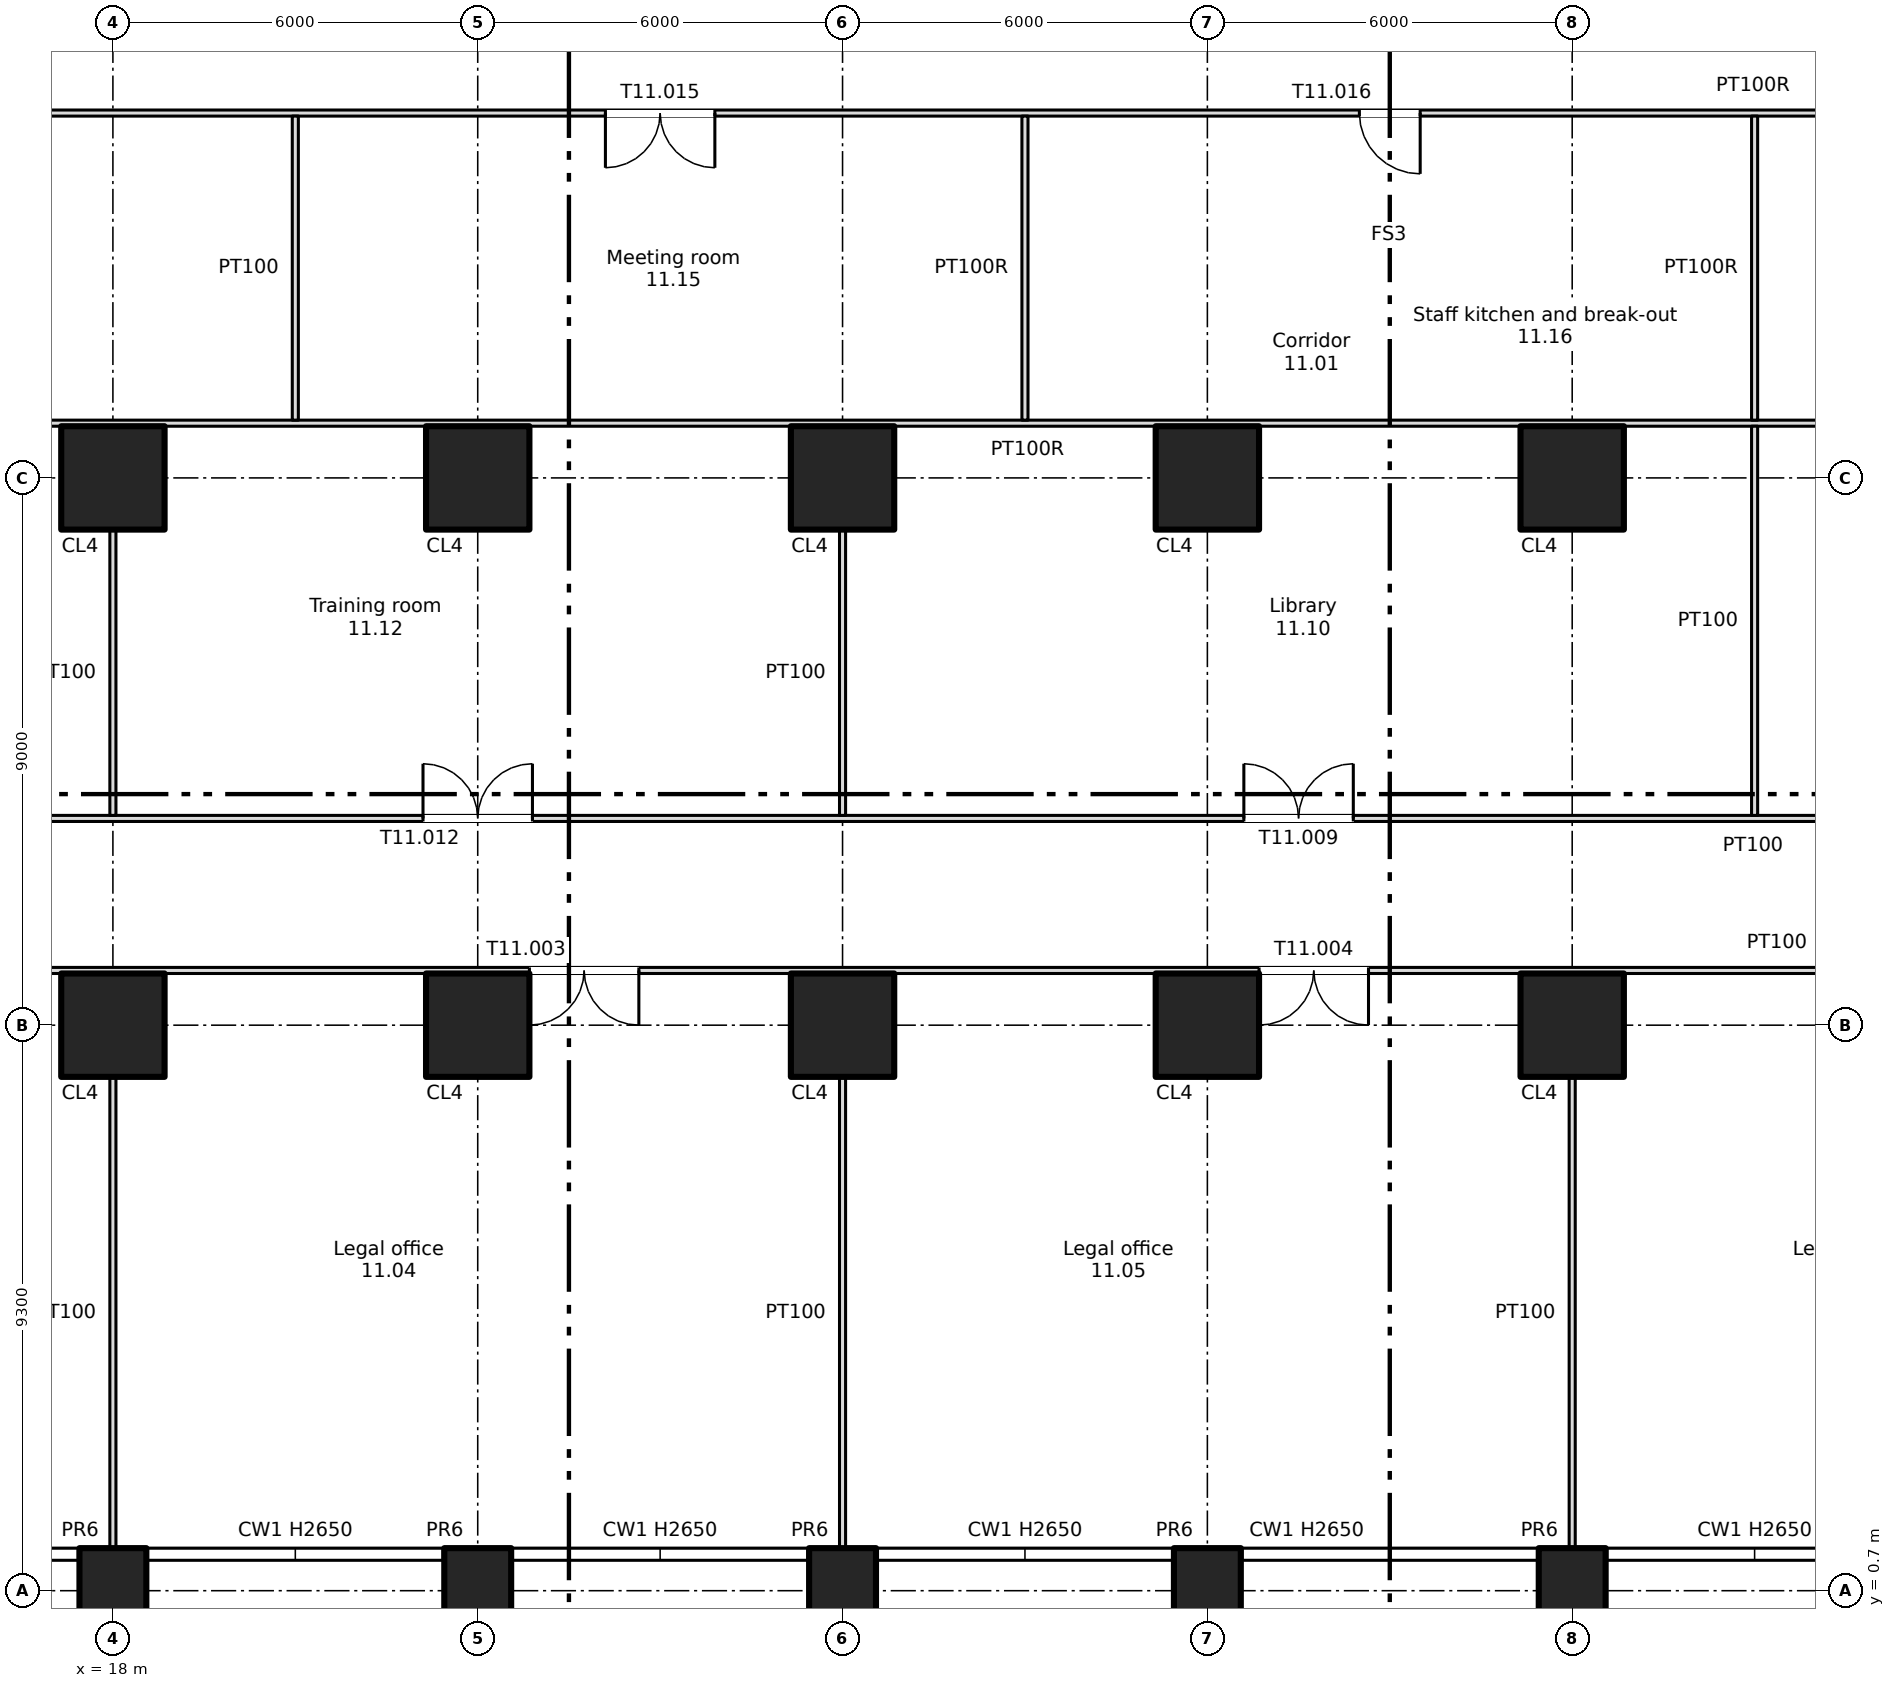
"""IFC4 building model, lengths in metres.
Left out: names, types, materials, properties, quantities, classifications, styles, units other than length and angle.
Written with IfcOpenShell. Run it as: python <this file> out.ifc"""

import sys

from ifc_helpers import new_model, si_unit, direction, frame, frame_2d, origin, origin_2d, place, context, subcontext, project, spatial, rectangle, extrude, element, fill, save


model = new_model("IFC4")
c1 = context("Model", 3, precision=1e-05, world=origin(), true_north=direction((0.0, 1.0)))
c2 = subcontext(c1, "Body", "Model", "MODEL_VIEW")
j1 = project(units=[si_unit("LENGTHUNIT", "METRE"), si_unit("PLANEANGLEUNIT", "RADIAN")], contexts=[c1])
p1 = place(None, origin())
s1 = spatial("IfcSite", under=j1, at=p1, CompositionType="ELEMENT")
p2 = place(p1, origin())
s2 = spatial("IfcBuilding", under=s1, at=p2, CompositionType="ELEMENT")
p3 = place(p2, frame((0.0, 0.0, 52.5)))
s3 = spatial("IfcBuildingStorey", under=s2, at=p3, CompositionType="ELEMENT", Elevation=52.5)
for number, where, z_axis, x_axis in (
    (1, (18.0, 0.7, -0.4), (0.0, 0.0, 1.0), (1.0, 0.0, 0.0)),
    (2, (24.0, 0.7, -0.4), (0.0, 0.0, 1.0), (1.0, 0.0, 0.0)),
    (3, (30.0, 0.7, -0.4), (0.0, 0.0, 1.0), (1.0, 0.0, 0.0)),
    (4, (36.0, 0.7, -0.4), (0.0, 0.0, 1.0), (1.0, 0.0, 0.0)),
    (5, (42.0, 0.7, -0.4), (0.0, 0.0, 1.0), (1.0, 0.0, 0.0)),
):
    element("IfcColumn", number, at=place(p3, frame(where, z_axis=z_axis, x_axis=x_axis)), inside=s3, PredefinedType="COLUMN", context=c2, shape_type="SweptSolid", body=[
        extrude(rectangle(XDim=1.1, YDim=1.4, at=origin_2d()), origin(), (0.0, 0.0, 1.0), 3.75),
    ])
for number, where, z_axis, x_axis in (
    (6, (18.0, 10.0, 0.0), (0.0, 0.0, 1.0), (1.0, 0.0, 0.0)),
    (7, (18.0, 19.0, 0.0), (0.0, 0.0, 1.0), (1.0, 0.0, 0.0)),
    (8, (24.0, 10.0, 0.0), (0.0, 0.0, 1.0), (1.0, 0.0, 0.0)),
    (9, (24.0, 19.0, 0.0), (0.0, 0.0, 1.0), (1.0, 0.0, 0.0)),
    (10, (30.0, 10.0, 0.0), (0.0, 0.0, 1.0), (1.0, 0.0, 0.0)),
    (11, (30.0, 19.0, 0.0), (0.0, 0.0, 1.0), (1.0, 0.0, 0.0)),
    (12, (36.0, 10.0, 0.0), (0.0, 0.0, 1.0), (1.0, 0.0, 0.0)),
    (13, (36.0, 19.0, 0.0), (0.0, 0.0, 1.0), (1.0, 0.0, 0.0)),
    (14, (42.0, 10.0, 0.0), (0.0, 0.0, 1.0), (1.0, 0.0, 0.0)),
    (15, (42.0, 19.0, 0.0), (0.0, 0.0, 1.0), (1.0, 0.0, 0.0)),
):
    element("IfcColumn", number, at=place(p3, frame(where, z_axis=z_axis, x_axis=x_axis)), inside=s3, PredefinedType="COLUMN", context=c2, shape_type="SweptSolid", body=[
        extrude(rectangle(XDim=1.7, YDim=1.7, at=origin_2d()), origin(), (0.0, 0.0, 1.0), 3.35),
    ])
p4 = place(p3, frame((0.8, 10.9, 0.0), z_axis=(0.0, 0.0, 1.0), x_axis=(1.0, 0.0, 0.0)))
e16 = element("IfcWall", 16, at=p4, inside=s3, PredefinedType="PARTITIONING", context=c2, shape_type="SweptSolid", body=[
    extrude(rectangle(XDim=76.4, YDim=0.1, at=frame_2d((38.2, 0.0))), origin(), (0.0, 0.0, 1.0), 3.35),
])
p5 = place(p4, frame((12.05, 0.0, 0.0)))
e17 = element("IfcOpeningElement", 17, at=p5, cuts=e16, PredefinedType="OPENING", context=c2, shape_type="SweptSolid", body=[
    extrude(rectangle(XDim=1.8, YDim=2.1, at=frame_2d((0.9, 1.05))), frame((0.0, 0.06, 0.0), z_axis=(0.0, -1.0, 0.0), x_axis=(1.0, 0.0, 0.0)), (0.0, 0.0, 1.0), 0.12),
])
p6 = place(p4, frame((56.55, 0.0, 0.0)))
e18 = element("IfcOpeningElement", 18, at=p6, cuts=e16, PredefinedType="OPENING", context=c2, shape_type="SweptSolid", body=[
    extrude(rectangle(XDim=1.8, YDim=2.1, at=frame_2d((0.9, 1.05))), frame((0.0, 0.06, 0.0), z_axis=(0.0, -1.0, 0.0), x_axis=(1.0, 0.0, 0.0)), (0.0, 0.0, 1.0), 0.12),
])
p7 = place(p4, frame((24.05, 0.0, 0.0)))
e19 = element("IfcOpeningElement", 19, at=p7, cuts=e16, PredefinedType="OPENING", context=c2, shape_type="SweptSolid", body=[
    extrude(rectangle(XDim=1.8, YDim=2.1, at=frame_2d((0.9, 1.05))), frame((0.0, 0.06, 0.0), z_axis=(0.0, -1.0, 0.0), x_axis=(1.0, 0.0, 0.0)), (0.0, 0.0, 1.0), 0.12),
])
p8 = place(p4, frame((36.05, 0.0, 0.0)))
e20 = element("IfcOpeningElement", 20, at=p8, cuts=e16, PredefinedType="OPENING", context=c2, shape_type="SweptSolid", body=[
    extrude(rectangle(XDim=1.8, YDim=2.1, at=frame_2d((0.9, 1.05))), frame((0.0, 0.06, 0.0), z_axis=(0.0, -1.0, 0.0), x_axis=(1.0, 0.0, 0.0)), (0.0, 0.0, 1.0), 0.12),
])
p9 = place(p4, frame((48.05, 0.0, 0.0)))
e21 = element("IfcOpeningElement", 21, at=p9, cuts=e16, PredefinedType="OPENING", context=c2, shape_type="SweptSolid", body=[
    extrude(rectangle(XDim=1.8, YDim=2.1, at=frame_2d((0.9, 1.05))), frame((0.0, 0.06, 0.0), z_axis=(0.0, -1.0, 0.0), x_axis=(1.0, 0.0, 0.0)), (0.0, 0.0, 1.0), 0.12),
])
p10 = place(p4, frame((68.4, 0.0, 0.0)))
e22 = element("IfcOpeningElement", 22, at=p10, cuts=e16, PredefinedType="OPENING", context=c2, shape_type="SweptSolid", body=[
    extrude(rectangle(XDim=1.8, YDim=2.1, at=frame_2d((0.9, 1.05))), frame((0.0, 0.06, 0.0), z_axis=(0.0, -1.0, 0.0), x_axis=(1.0, 0.0, 0.0)), (0.0, 0.0, 1.0), 0.12),
])
p11 = place(p4, frame((2.45, 0.0, 0.0)))
e23 = element("IfcOpeningElement", 23, at=p11, cuts=e16, PredefinedType="OPENING", context=c2, shape_type="SweptSolid", body=[
    extrude(rectangle(XDim=1.8, YDim=2.1, at=frame_2d((0.9, 1.05))), frame((0.0, 0.06, 0.0), z_axis=(0.0, -1.0, 0.0), x_axis=(1.0, 0.0, 0.0)), (0.0, 0.0, 1.0), 0.12),
])
p12 = place(p3, frame((3.15, 13.4, 0.0), z_axis=(0.0, 0.0, 1.0), x_axis=(1.0, 0.0, 0.0)))
e24 = element("IfcWall", 24, at=p12, inside=s3, PredefinedType="PARTITIONING", context=c2, shape_type="SweptSolid", body=[
    extrude(rectangle(XDim=71.7, YDim=0.1, at=frame_2d((35.85, 0.0))), origin(), (0.0, 0.0, 1.0), 3.35),
])
p13 = place(p12, frame((6.55, 0.0, 0.0)))
e25 = element("IfcOpeningElement", 25, at=p13, cuts=e24, PredefinedType="OPENING", context=c2, shape_type="SweptSolid", body=[
    extrude(rectangle(XDim=1.8, YDim=2.1, at=frame_2d((0.9, 1.05))), frame((0.0, 0.06, 0.0), z_axis=(0.0, -1.0, 0.0), x_axis=(1.0, 0.0, 0.0)), (0.0, 0.0, 1.0), 0.12),
])
p14 = place(p12, frame((33.45, 0.0, 0.0)))
e26 = element("IfcOpeningElement", 26, at=p14, cuts=e24, PredefinedType="OPENING", context=c2, shape_type="SweptSolid", body=[
    extrude(rectangle(XDim=1.8, YDim=2.1, at=frame_2d((0.9, 1.05))), frame((0.0, 0.06, 0.0), z_axis=(0.0, -1.0, 0.0), x_axis=(1.0, 0.0, 0.0)), (0.0, 0.0, 1.0), 0.12),
])
p15 = place(p12, frame((48.7, 0.0, 0.0)))
e27 = element("IfcOpeningElement", 27, at=p15, cuts=e24, PredefinedType="OPENING", context=c2, shape_type="SweptSolid", body=[
    extrude(rectangle(XDim=1.2, YDim=2.1, at=frame_2d((0.6, 1.05))), frame((0.0, 0.06, 0.0), z_axis=(0.0, -1.0, 0.0), x_axis=(1.0, 0.0, 0.0)), (0.0, 0.0, 1.0), 0.12),
])
p16 = place(p12, frame((63.6, 0.0, 0.0)))
e28 = element("IfcOpeningElement", 28, at=p16, cuts=e24, PredefinedType="OPENING", context=c2, shape_type="SweptSolid", body=[
    extrude(rectangle(XDim=1.2, YDim=2.1, at=frame_2d((0.6, 1.05))), frame((0.0, 0.06, 0.0), z_axis=(0.0, -1.0, 0.0), x_axis=(1.0, 0.0, 0.0)), (0.0, 0.0, 1.0), 0.12),
])
p17 = place(p12, frame((19.95, 0.0, 0.0)))
e29 = element("IfcOpeningElement", 29, at=p17, cuts=e24, PredefinedType="OPENING", context=c2, shape_type="SweptSolid", body=[
    extrude(rectangle(XDim=1.8, YDim=2.1, at=frame_2d((0.9, 1.05))), frame((0.0, 0.06, 0.0), z_axis=(0.0, -1.0, 0.0), x_axis=(1.0, 0.0, 0.0)), (0.0, 0.0, 1.0), 0.12),
])
p18 = place(p3, frame((3.25, 19.9, 0.0), z_axis=(0.0, 0.0, 1.0), x_axis=(1.0, 0.0, 0.0)))
e30 = element("IfcWall", 30, at=p18, inside=s3, PredefinedType="PARTITIONING", context=c2, shape_type="SweptSolid", body=[
    extrude(rectangle(XDim=71.5, YDim=0.1, at=frame_2d((35.75, 0.0))), origin(), (0.0, 0.0, 1.0), 3.35),
])
p19 = place(p3, frame((3.15, 25.0, 0.0), z_axis=(0.0, 0.0, 1.0), x_axis=(1.0, 0.0, 0.0)))
e31 = element("IfcWall", 31, at=p19, inside=s3, PredefinedType="PARTITIONING", context=c2, shape_type="SweptSolid", body=[
    extrude(rectangle(XDim=71.7, YDim=0.1, at=frame_2d((35.85, 0.0))), origin(), (0.0, 0.0, 1.0), 3.35),
])
p20 = place(p19, frame((8.05, 0.0, 0.0)))
e32 = element("IfcOpeningElement", 32, at=p20, cuts=e31, PredefinedType="OPENING", context=c2, shape_type="SweptSolid", body=[
    extrude(rectangle(XDim=1.8, YDim=2.1, at=frame_2d((0.9, 1.05))), frame((0.0, 0.06, 0.0), z_axis=(0.0, -1.0, 0.0), x_axis=(1.0, 0.0, 0.0)), (0.0, 0.0, 1.0), 0.12),
])
p21 = place(p19, frame((61.85, 0.0, 0.0)))
e33 = element("IfcOpeningElement", 33, at=p21, cuts=e31, PredefinedType="OPENING", context=c2, shape_type="SweptSolid", body=[
    extrude(rectangle(XDim=1.8, YDim=2.1, at=frame_2d((0.9, 1.05))), frame((0.0, 0.06, 0.0), z_axis=(0.0, -1.0, 0.0), x_axis=(1.0, 0.0, 0.0)), (0.0, 0.0, 1.0), 0.12),
])
p22 = place(p19, frame((22.95, 0.0, 0.0)))
e34 = element("IfcOpeningElement", 34, at=p22, cuts=e31, PredefinedType="OPENING", context=c2, shape_type="SweptSolid", body=[
    extrude(rectangle(XDim=1.8, YDim=2.1, at=frame_2d((0.9, 1.05))), frame((0.0, 0.06, 0.0), z_axis=(0.0, -1.0, 0.0), x_axis=(1.0, 0.0, 0.0)), (0.0, 0.0, 1.0), 0.12),
])
p23 = place(p19, frame((35.35, 0.0, 0.0)))
e35 = element("IfcOpeningElement", 35, at=p23, cuts=e31, PredefinedType="OPENING", context=c2, shape_type="SweptSolid", body=[
    extrude(rectangle(XDim=1.0, YDim=2.1, at=frame_2d((0.5, 1.05))), frame((0.0, 0.06, 0.0), z_axis=(0.0, -1.0, 0.0), x_axis=(1.0, 0.0, 0.0)), (0.0, 0.0, 1.0), 0.12),
])
p24 = place(p19, frame((46.95, 0.0, 0.0)))
e36 = element("IfcOpeningElement", 36, at=p24, cuts=e31, PredefinedType="OPENING", context=c2, shape_type="SweptSolid", body=[
    extrude(rectangle(XDim=1.8, YDim=2.1, at=frame_2d((0.9, 1.05))), frame((0.0, 0.06, 0.0), z_axis=(0.0, -1.0, 0.0), x_axis=(1.0, 0.0, 0.0)), (0.0, 0.0, 1.0), 0.12),
])
p25 = place(p3, frame((18.0, 1.4, 0.0), z_axis=(0.0, 0.0, 1.0), x_axis=(0.0, 1.0, 0.0)))
e37 = element("IfcWall", 37, at=p25, inside=s3, PredefinedType="PARTITIONING", context=c2, shape_type="SweptSolid", body=[
    extrude(rectangle(XDim=7.75, YDim=0.1, at=frame_2d((3.875, 0.0))), origin(), (0.0, 0.0, 1.0), 3.35),
])
p26 = place(p3, frame((18.0, 13.45, 0.0), z_axis=(0.0, 0.0, 1.0), x_axis=(0.0, 1.0, 0.0)))
e38 = element("IfcWall", 38, at=p26, inside=s3, PredefinedType="PARTITIONING", context=c2, shape_type="SweptSolid", body=[
    extrude(rectangle(XDim=4.7, YDim=0.1, at=frame_2d((2.35, 0.0))), origin(), (0.0, 0.0, 1.0), 3.35),
])
p27 = place(p3, frame((21.0, 19.95, 0.0), z_axis=(0.0, 0.0, 1.0), x_axis=(0.0, 1.0, 0.0)))
e39 = element("IfcWall", 39, at=p27, inside=s3, PredefinedType="PARTITIONING", context=c2, shape_type="SweptSolid", body=[
    extrude(rectangle(XDim=5.0, YDim=0.1, at=frame_2d((2.5, 0.0))), origin(), (0.0, 0.0, 1.0), 3.35),
])
p28 = place(p3, frame((30.0, 1.4, 0.0), z_axis=(0.0, 0.0, 1.0), x_axis=(0.0, 1.0, 0.0)))
e40 = element("IfcWall", 40, at=p28, inside=s3, PredefinedType="PARTITIONING", context=c2, shape_type="SweptSolid", body=[
    extrude(rectangle(XDim=7.75, YDim=0.1, at=frame_2d((3.875, 0.0))), origin(), (0.0, 0.0, 1.0), 3.35),
])
p29 = place(p3, frame((30.0, 13.45, 0.0), z_axis=(0.0, 0.0, 1.0), x_axis=(0.0, 1.0, 0.0)))
e41 = element("IfcWall", 41, at=p29, inside=s3, PredefinedType="PARTITIONING", context=c2, shape_type="SweptSolid", body=[
    extrude(rectangle(XDim=4.7, YDim=0.1, at=frame_2d((2.35, 0.0))), origin(), (0.0, 0.0, 1.0), 3.35),
])
p30 = place(p3, frame((33.0, 19.95, 0.0), z_axis=(0.0, 0.0, 1.0), x_axis=(0.0, 1.0, 0.0)))
e42 = element("IfcWall", 42, at=p30, inside=s3, PredefinedType="PARTITIONING", context=c2, shape_type="SweptSolid", body=[
    extrude(rectangle(XDim=5.0, YDim=0.1, at=frame_2d((2.5, 0.0))), origin(), (0.0, 0.0, 1.0), 3.35),
])
p31 = place(p3, frame((42.0, 1.4, 0.0), z_axis=(0.0, 0.0, 1.0), x_axis=(0.0, 1.0, 0.0)))
e43 = element("IfcWall", 43, at=p31, inside=s3, PredefinedType="PARTITIONING", context=c2, shape_type="SweptSolid", body=[
    extrude(rectangle(XDim=7.75, YDim=0.1, at=frame_2d((3.875, 0.0))), origin(), (0.0, 0.0, 1.0), 3.35),
])
p32 = place(p3, frame((45.0, 13.45, 0.0), z_axis=(0.0, 0.0, 1.0), x_axis=(0.0, 1.0, 0.0)))
e44 = element("IfcWall", 44, at=p32, inside=s3, PredefinedType="PARTITIONING", context=c2, shape_type="SweptSolid", body=[
    extrude(rectangle(XDim=6.4, YDim=0.1, at=frame_2d((3.2, 0.0))), origin(), (0.0, 0.0, 1.0), 3.35),
])
p33 = place(p3, frame((45.0, 19.95, 0.0), z_axis=(0.0, 0.0, 1.0), x_axis=(0.0, 1.0, 0.0)))
e45 = element("IfcWall", 45, at=p33, inside=s3, PredefinedType="PARTITIONING", context=c2, shape_type="SweptSolid", body=[
    extrude(rectangle(XDim=5.0, YDim=0.1, at=frame_2d((2.5, 0.0))), origin(), (0.0, 0.0, 1.0), 3.35),
])
p34 = place(p7, origin())
e46 = element("IfcDoor", 46, at=p34, inside=s3, OperationType="DOUBLE_DOOR_SINGLE_SWING", PredefinedType="DOOR", context=c2, shape_type="SweptSolid", body=[
    extrude(rectangle(XDim=1.8, YDim=2.1, at=frame_2d((0.9, 1.05))), frame((0.0, 0.025, 0.0), z_axis=(0.0, -1.0, 0.0), x_axis=(1.0, 0.0, 0.0)), (0.0, 0.0, 1.0), 0.05),
])
fill(e19, e46)
p35 = place(p8, origin())
e47 = element("IfcDoor", 47, at=p35, inside=s3, OperationType="DOUBLE_DOOR_SINGLE_SWING", PredefinedType="DOOR", context=c2, shape_type="SweptSolid", body=[
    extrude(rectangle(XDim=1.8, YDim=2.1, at=frame_2d((0.9, 1.05))), frame((0.0, 0.025, 0.0), z_axis=(0.0, -1.0, 0.0), x_axis=(1.0, 0.0, 0.0)), (0.0, 0.0, 1.0), 0.05),
])
fill(e20, e47)
p36 = place(p14, origin())
e48 = element("IfcDoor", 48, at=p36, inside=s3, OperationType="DOUBLE_DOOR_SINGLE_SWING", PredefinedType="DOOR", context=c2, shape_type="SweptSolid", body=[
    extrude(rectangle(XDim=1.8, YDim=2.1, at=frame_2d((0.9, 1.05))), frame((0.0, 0.025, 0.0), z_axis=(0.0, -1.0, 0.0), x_axis=(1.0, 0.0, 0.0)), (0.0, 0.0, 1.0), 0.05),
])
fill(e26, e48)
p37 = place(p17, origin())
e49 = element("IfcDoor", 49, at=p37, inside=s3, OperationType="DOUBLE_DOOR_SINGLE_SWING", PredefinedType="DOOR", context=c2, shape_type="SweptSolid", body=[
    extrude(rectangle(XDim=1.8, YDim=2.1, at=frame_2d((0.9, 1.05))), frame((0.0, 0.025, 0.0), z_axis=(0.0, -1.0, 0.0), x_axis=(1.0, 0.0, 0.0)), (0.0, 0.0, 1.0), 0.05),
])
fill(e29, e49)
p38 = place(p22, origin())
e50 = element("IfcDoor", 50, at=p38, inside=s3, OperationType="DOUBLE_DOOR_SINGLE_SWING", PredefinedType="DOOR", context=c2, shape_type="SweptSolid", body=[
    extrude(rectangle(XDim=1.8, YDim=2.1, at=frame_2d((0.9, 1.05))), frame((0.0, 0.025, 0.0), z_axis=(0.0, -1.0, 0.0), x_axis=(1.0, 0.0, 0.0)), (0.0, 0.0, 1.0), 0.05),
])
fill(e34, e50)
p39 = place(p23, origin())
e51 = element("IfcDoor", 51, at=p39, inside=s3, OperationType="SINGLE_SWING_RIGHT", PredefinedType="DOOR", context=c2, shape_type="SweptSolid", body=[
    extrude(rectangle(XDim=1.0, YDim=2.1, at=frame_2d((0.5, 1.05))), frame((0.0, 0.025, 0.0), z_axis=(0.0, -1.0, 0.0), x_axis=(1.0, 0.0, 0.0)), (0.0, 0.0, 1.0), 0.05),
])
fill(e35, e51)
save(model, sys.argv[1])
